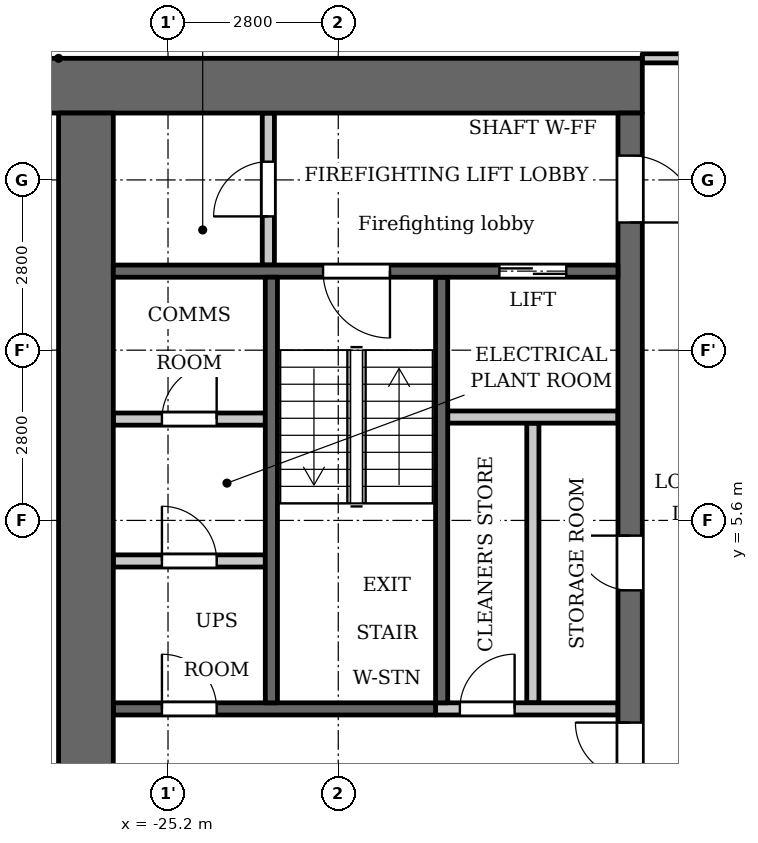
"""IFC4 building model, lengths in metres.
Left out: names, types, materials, properties, quantities, classifications, styles, units other than length and angle.
Written with IfcOpenShell. Run it as: python <this file> out.ifc"""

import sys

from ifc_helpers import new_model, si_unit, direction, frame, frame_2d, origin, place, context, subcontext, project, spatial, rectangle, extrude, element, fill, save


model = new_model("IFC4")
c1 = context("Model", 3, precision=1e-05, world=origin(), true_north=direction((0.0, 1.0)))
c2 = subcontext(c1, "Body", "Model", "MODEL_VIEW")
j1 = project(units=[si_unit("LENGTHUNIT", "METRE"), si_unit("PLANEANGLEUNIT", "RADIAN")], contexts=[c1])
p1 = place(None, origin())
s1 = spatial("IfcSite", under=j1, at=p1, CompositionType="ELEMENT")
p2 = place(p1, origin())
s2 = spatial("IfcBuilding", under=s1, at=p2, CompositionType="ELEMENT")
p3 = place(p2, frame((0.0, 0.0, 48.0)))
s3 = spatial("IfcBuildingStorey", under=s2, at=p3, CompositionType="ELEMENT", Elevation=48.0)
p4 = place(p3, frame((-20.7, 2.6, 0.0), z_axis=(0.0, 0.0, 1.0), x_axis=(0.0, 1.0, 0.0)))
e1 = element("IfcWall", 1, at=p4, inside=s3, PredefinedType="SHEAR", context=c2, shape_type="SweptSolid", body=[
    extrude(rectangle(XDim=7.0, YDim=0.2, at=frame_2d((3.5, 0.0))), origin(), (0.0, 0.0, 1.0), 3.2),
])
p5 = place(p3, frame((-20.8, 2.5, 0.0), z_axis=(0.0, 0.0, 1.0), x_axis=(-1.0, 0.0, 0.0)))
e2 = element("IfcWall", 2, at=p5, inside=s3, PredefinedType="SHEAR", context=c2, shape_type="SweptSolid", body=[
    extrude(rectangle(XDim=5.3, YDim=0.2, at=frame_2d((2.65, 0.0))), origin(), (0.0, 0.0, 1.0), 3.2),
])
p6 = place(p5, frame((3.6, 0.0, 0.0)))
e3 = element("IfcOpeningElement", 3, at=p6, cuts=e2, PredefinedType="OPENING", context=c2, shape_type="SweptSolid", body=[
    extrude(rectangle(XDim=0.9, YDim=2.1, at=frame_2d((0.45, 1.05))), frame((0.0, 0.11, 0.0), z_axis=(0.0, -1.0, 0.0), x_axis=(1.0, 0.0, 0.0)), (0.0, 0.0, 1.0), 0.22),
])
p7 = place(p3, frame((-17.4, 12.75, 0.0), z_axis=(0.0, 0.0, 1.0), x_axis=(-1.0, 0.0, 0.0)))
e4 = element("IfcWall", 4, at=p7, inside=s3, PredefinedType="SHEAR", context=c2, shape_type="SweptSolid", body=[
    extrude(rectangle(XDim=10.4, YDim=0.9, at=frame_2d((5.2, 0.0))), origin(), (0.0, 0.0, 1.0), 3.2),
])
p8 = place(p3, frame((-19.2, 2.6, 0.0), z_axis=(0.0, 0.0, 1.0), x_axis=(0.0, 1.0, 0.0)))
e5 = element("IfcWall", 5, at=p8, inside=s3, PredefinedType="PARTITIONING", context=c2, shape_type="SweptSolid", body=[
    extrude(rectangle(XDim=4.6, YDim=0.2, at=frame_2d((2.3, 0.0))), origin(), (0.0, 0.0, 1.0), 3.2),
])
p9 = place(p3, frame((-17.6, -12.3, 0.0), z_axis=(0.0, 0.0, 1.0), x_axis=(0.0, 1.0, 0.0)))
e6 = element("IfcWall", 6, at=p9, inside=s3, PredefinedType="SHEAR", context=c2, shape_type="SweptSolid", body=[
    extrude(rectangle(XDim=24.6, YDim=0.4, at=frame_2d((12.3, 0.0))), origin(), (0.0, 0.0, 1.0), 3.2),
])
p10 = place(p9, frame((6.0, 0.0, 0.0)))
e7 = element("IfcOpeningElement", 7, at=p10, cuts=e6, PredefinedType="OPENING", context=c2, shape_type="SweptSolid", body=[
    extrude(rectangle(XDim=1.1, YDim=2.1, at=frame_2d((0.55, 1.05))), frame((0.0, 0.21, 0.0), z_axis=(0.0, -1.0, 0.0), x_axis=(1.0, 0.0, 0.0)), (0.0, 0.0, 1.0), 0.42),
])
p11 = place(p9, frame((8.4, 0.0, 0.0)))
e8 = element("IfcOpeningElement", 8, at=p11, cuts=e6, PredefinedType="OPENING", context=c2, shape_type="SweptSolid", body=[
    extrude(rectangle(XDim=1.1, YDim=2.1, at=frame_2d((0.55, 1.05))), frame((0.0, 0.21, 0.0), z_axis=(0.0, -1.0, 0.0), x_axis=(1.0, 0.0, 0.0)), (0.0, 0.0, 1.0), 0.42),
])
p12 = place(p9, frame((10.8, 0.0, 0.0)))
e9 = element("IfcOpeningElement", 9, at=p12, cuts=e6, PredefinedType="OPENING", context=c2, shape_type="SweptSolid", body=[
    extrude(rectangle(XDim=1.1, YDim=2.1, at=frame_2d((0.55, 1.05))), frame((0.0, 0.21, 0.0), z_axis=(0.0, -1.0, 0.0), x_axis=(1.0, 0.0, 0.0)), (0.0, 0.0, 1.0), 0.42),
])
p13 = place(p9, frame((16.75, 0.0, 0.0)))
e10 = element("IfcOpeningElement", 10, at=p13, cuts=e6, PredefinedType="OPENING", context=c2, shape_type="SweptSolid", body=[
    extrude(rectangle(XDim=0.9, YDim=2.1, at=frame_2d((0.45, 1.05))), frame((0.0, 0.21, 0.0), z_axis=(0.0, -1.0, 0.0), x_axis=(1.0, 0.0, 0.0)), (0.0, 0.0, 1.0), 0.42),
])
p14 = place(p9, frame((22.8, 0.0, 0.0)))
e11 = element("IfcOpeningElement", 11, at=p14, cuts=e6, PredefinedType="OPENING", context=c2, shape_type="SweptSolid", body=[
    extrude(rectangle(XDim=1.1, YDim=2.1, at=frame_2d((0.55, 1.05))), frame((0.0, 0.21, 0.0), z_axis=(0.0, -1.0, 0.0), x_axis=(1.0, 0.0, 0.0)), (0.0, 0.0, 1.0), 0.42),
])
p15 = place(p9, frame((0.7, 0.0, 0.0)))
e12 = element("IfcOpeningElement", 12, at=p15, cuts=e6, PredefinedType="OPENING", context=c2, shape_type="SweptSolid", body=[
    extrude(rectangle(XDim=1.1, YDim=2.1, at=frame_2d((0.55, 1.05))), frame((0.0, 0.21, 0.0), z_axis=(0.0, -1.0, 0.0), x_axis=(1.0, 0.0, 0.0)), (0.0, 0.0, 1.0), 0.42),
])
p16 = place(p9, frame((12.775, 0.0, 0.0)))
e13 = element("IfcOpeningElement", 13, at=p16, cuts=e6, PredefinedType="OPENING", context=c2, shape_type="SweptSolid", body=[
    extrude(rectangle(XDim=1.8, YDim=2.1, at=frame_2d((0.9, 1.05))), frame((0.0, 0.21, 0.0), z_axis=(0.0, -1.0, 0.0), x_axis=(1.0, 0.0, 0.0)), (0.0, 0.0, 1.0), 0.42),
])
p17 = place(p3, frame((-26.55, -12.3, 0.0), z_axis=(0.0, 0.0, 1.0), x_axis=(0.0, 1.0, 0.0)))
e14 = element("IfcWall", 14, at=p17, inside=s3, PredefinedType="SHEAR", context=c2, shape_type="SweptSolid", body=[
    extrude(rectangle(XDim=24.6, YDim=0.9, at=frame_2d((12.3, 0.0))), origin(), (0.0, 0.0, 1.0), 3.2),
])
p18 = place(p3, frame((-23.55, 9.8, 0.0), z_axis=(0.0, 0.0, 1.0), x_axis=(0.0, 1.0, 0.0)))
e15 = element("IfcWall", 15, at=p18, inside=s3, PredefinedType="PARTITIONING", context=c2, shape_type="SweptSolid", body=[
    extrude(rectangle(XDim=2.5, YDim=0.2, at=frame_2d((1.25, 0.0))), origin(), (0.0, 0.0, 1.0), 3.2),
])
p19 = place(p18, frame((0.8, 0.0, 0.0)))
e16 = element("IfcOpeningElement", 16, at=p19, cuts=e15, PredefinedType="OPENING", context=c2, shape_type="SweptSolid", body=[
    extrude(rectangle(XDim=0.9, YDim=2.1, at=frame_2d((0.45, 1.05))), frame((0.0, 0.11, 0.0), z_axis=(0.0, -1.0, 0.0), x_axis=(1.0, 0.0, 0.0)), (0.0, 0.0, 1.0), 0.22),
])
p20 = place(p3, frame((-23.6, 4.933, 0.0), z_axis=(0.0, 0.0, 1.0), x_axis=(-1.0, 0.0, 0.0)))
e17 = element("IfcWall", 17, at=p20, inside=s3, PredefinedType="PARTITIONING", context=c2, shape_type="SweptSolid", body=[
    extrude(rectangle(XDim=2.5, YDim=0.2, at=frame_2d((1.25, 0.0))), origin(), (0.0, 0.0, 1.0), 3.2),
])
p21 = place(p20, frame((0.8, 0.0, 0.0)))
e18 = element("IfcOpeningElement", 18, at=p21, cuts=e17, PredefinedType="OPENING", context=c2, shape_type="SweptSolid", body=[
    extrude(rectangle(XDim=0.9, YDim=2.1, at=frame_2d((0.45, 1.05))), frame((0.0, 0.11, 0.0), z_axis=(0.0, -1.0, 0.0), x_axis=(1.0, 0.0, 0.0)), (0.0, 0.0, 1.0), 0.22),
])
p22 = place(p3, frame((-23.6, 7.267, 0.0), z_axis=(0.0, 0.0, 1.0), x_axis=(-1.0, 0.0, 0.0)))
e19 = element("IfcWall", 19, at=p22, inside=s3, PredefinedType="PARTITIONING", context=c2, shape_type="SweptSolid", body=[
    extrude(rectangle(XDim=2.5, YDim=0.2, at=frame_2d((1.25, 0.0))), origin(), (0.0, 0.0, 1.0), 3.2),
])
p23 = place(p22, frame((0.8, 0.0, 0.0)))
e20 = element("IfcOpeningElement", 20, at=p23, cuts=e19, PredefinedType="OPENING", context=c2, shape_type="SweptSolid", body=[
    extrude(rectangle(XDim=0.9, YDim=2.1, at=frame_2d((0.45, 1.05))), frame((0.0, 0.11, 0.0), z_axis=(0.0, -1.0, 0.0), x_axis=(1.0, 0.0, 0.0)), (0.0, 0.0, 1.0), 0.22),
])
p24 = place(p3, frame((-17.8, 2.5, 0.0), z_axis=(0.0, 0.0, 1.0), x_axis=(-1.0, 0.0, 0.0)))
e21 = element("IfcWall", 21, at=p24, inside=s3, PredefinedType="PARTITIONING", context=c2, shape_type="SweptSolid", body=[
    extrude(rectangle(XDim=3.0, YDim=0.2, at=frame_2d((1.5, 0.0))), origin(), (0.0, 0.0, 1.0), 3.2),
])
p25 = place(p24, frame((1.7, 0.0, 0.0)))
e22 = element("IfcOpeningElement", 22, at=p25, cuts=e21, PredefinedType="OPENING", context=c2, shape_type="SweptSolid", body=[
    extrude(rectangle(XDim=0.9, YDim=2.1, at=frame_2d((0.45, 1.05))), frame((0.0, 0.11, 0.0), z_axis=(0.0, -1.0, 0.0), x_axis=(1.0, 0.0, 0.0)), (0.0, 0.0, 1.0), 0.22),
])
p26 = place(p3, frame((-17.8, 7.3, 0.0), z_axis=(0.0, 0.0, 1.0), x_axis=(-1.0, 0.0, 0.0)))
e23 = element("IfcWall", 23, at=p26, inside=s3, PredefinedType="PARTITIONING", context=c2, shape_type="SweptSolid", body=[
    extrude(rectangle(XDim=2.8, YDim=0.2, at=frame_2d((1.4, 0.0))), origin(), (0.0, 0.0, 1.0), 3.2),
])
p27 = place(p3, frame((-17.8, 9.7, 0.0), z_axis=(0.0, 0.0, 1.0), x_axis=(-1.0, 0.0, 0.0)))
e24 = element("IfcWall", 24, at=p27, inside=s3, PredefinedType="SHEAR", context=c2, shape_type="SweptSolid", body=[
    extrude(rectangle(XDim=8.3, YDim=0.2, at=frame_2d((4.15, 0.0))), origin(), (0.0, 0.0, 1.0), 3.2),
])
p28 = place(p27, frame((0.85, 0.0, 0.0)))
e25 = element("IfcOpeningElement", 25, at=p28, cuts=e24, PredefinedType="OPENING", context=c2, shape_type="SweptSolid", body=[
    extrude(rectangle(XDim=1.1, YDim=2.1, at=frame_2d((0.55, 1.05))), frame((0.0, 0.11, 0.0), z_axis=(0.0, -1.0, 0.0), x_axis=(1.0, 0.0, 0.0)), (0.0, 0.0, 1.0), 0.22),
])
p29 = place(p27, frame((3.75, 0.0, 0.0)))
e26 = element("IfcOpeningElement", 26, at=p29, cuts=e24, PredefinedType="OPENING", context=c2, shape_type="SweptSolid", body=[
    extrude(rectangle(XDim=1.1, YDim=2.1, at=frame_2d((0.55, 1.05))), frame((0.0, 0.11, 0.0), z_axis=(0.0, -1.0, 0.0), x_axis=(1.0, 0.0, 0.0)), (0.0, 0.0, 1.0), 0.22),
])
p30 = place(p3, frame((-23.5, 2.6, 0.0), z_axis=(0.0, 0.0, 1.0), x_axis=(0.0, 1.0, 0.0)))
e27 = element("IfcWall", 27, at=p30, inside=s3, PredefinedType="SHEAR", context=c2, shape_type="SweptSolid", body=[
    extrude(rectangle(XDim=7.0, YDim=0.2, at=frame_2d((3.5, 0.0))), origin(), (0.0, 0.0, 1.0), 3.2),
])
p31 = place(p3, frame((-17.4, 13.2, 0.0), z_axis=(0.0, 0.0, 1.0), x_axis=(1.0, 0.0, 0.0)))
e28 = element("IfcWall", 28, at=p31, inside=s3, PredefinedType="PARTITIONING", context=c2, shape_type="SweptSolid", body=[
    extrude(rectangle(XDim=34.8, YDim=0.15, at=frame_2d((17.4, 0.0))), origin(), (0.0, 0.0, 1.0), 3.2),
])
p32 = place(p31, frame((0.75, 0.0, 0.0)))
e29 = element("IfcOpeningElement", 29, at=p32, cuts=e28, PredefinedType="OPENING", context=c2, shape_type="SweptSolid", body=[
    extrude(rectangle(XDim=1.0, YDim=2.1, at=frame_2d((0.5, 1.05))), frame((0.0, 0.085, 0.0), z_axis=(0.0, -1.0, 0.0), x_axis=(1.0, 0.0, 0.0)), (0.0, 0.0, 1.0), 0.17),
])
p33 = place(p31, frame((33.15, 0.0, 0.0)))
e30 = element("IfcOpeningElement", 30, at=p33, cuts=e28, PredefinedType="OPENING", context=c2, shape_type="SweptSolid", body=[
    extrude(rectangle(XDim=1.0, YDim=2.1, at=frame_2d((0.5, 1.05))), frame((0.0, 0.085, 0.0), z_axis=(0.0, -1.0, 0.0), x_axis=(1.0, 0.0, 0.0)), (0.0, 0.0, 1.0), 0.17),
])
p34 = place(p31, frame((3.05, 0.0, 0.0)))
e31 = element("IfcOpeningElement", 31, at=p34, cuts=e28, PredefinedType="OPENING", context=c2, shape_type="SweptSolid", body=[
    extrude(rectangle(XDim=1.0, YDim=2.1, at=frame_2d((0.5, 1.05))), frame((0.0, 0.085, 0.0), z_axis=(0.0, -1.0, 0.0), x_axis=(1.0, 0.0, 0.0)), (0.0, 0.0, 1.0), 0.17),
])
p35 = place(p31, frame((12.45, 0.0, 0.0)))
e32 = element("IfcOpeningElement", 32, at=p35, cuts=e28, PredefinedType="OPENING", context=c2, shape_type="SweptSolid", body=[
    extrude(rectangle(XDim=1.0, YDim=2.1, at=frame_2d((0.5, 1.05))), frame((0.0, 0.085, 0.0), z_axis=(0.0, -1.0, 0.0), x_axis=(1.0, 0.0, 0.0)), (0.0, 0.0, 1.0), 0.17),
])
p36 = place(p31, frame((18.3, 0.0, 0.0)))
e33 = element("IfcOpeningElement", 33, at=p36, cuts=e28, PredefinedType="OPENING", context=c2, shape_type="SweptSolid", body=[
    extrude(rectangle(XDim=1.0, YDim=2.1, at=frame_2d((0.5, 1.05))), frame((0.0, 0.085, 0.0), z_axis=(0.0, -1.0, 0.0), x_axis=(1.0, 0.0, 0.0)), (0.0, 0.0, 1.0), 0.17),
])
p37 = place(p31, frame((29.25, 0.0, 0.0)))
e34 = element("IfcOpeningElement", 34, at=p37, cuts=e28, PredefinedType="OPENING", context=c2, shape_type="SweptSolid", body=[
    extrude(rectangle(XDim=1.0, YDim=2.1, at=frame_2d((0.5, 1.05))), frame((0.0, 0.085, 0.0), z_axis=(0.0, -1.0, 0.0), x_axis=(1.0, 0.0, 0.0)), (0.0, 0.0, 1.0), 0.17),
])
p38 = place(p13, origin())
e35 = element("IfcDoor", 35, at=p38, inside=s3, OperationType="SINGLE_SWING_LEFT", PredefinedType="DOOR", context=c2, shape_type="SweptSolid", body=[
    extrude(rectangle(XDim=0.9, YDim=2.1, at=frame_2d((0.45, 1.05))), frame((0.0, 0.025, 0.0), z_axis=(0.0, -1.0, 0.0), x_axis=(1.0, 0.0, 0.0)), (0.0, 0.0, 1.0), 0.05),
])
fill(e10, e35)
p39 = place(p25, origin())
e36 = element("IfcDoor", 36, at=p39, inside=s3, OperationType="SINGLE_SWING_LEFT", PredefinedType="DOOR", context=c2, shape_type="SweptSolid", body=[
    extrude(rectangle(XDim=0.9, YDim=2.1, at=frame_2d((0.45, 1.05))), frame((0.0, 0.025, 0.0), z_axis=(0.0, -1.0, 0.0), x_axis=(1.0, 0.0, 0.0)), (0.0, 0.0, 1.0), 0.05),
])
fill(e22, e36)
p40 = place(p28, origin())
e37 = element("IfcDoor", 37, at=p40, inside=s3, OperationType="DOUBLE_DOOR_SLIDING", PredefinedType="DOOR", context=c2, shape_type="SweptSolid", body=[
    extrude(rectangle(XDim=1.1, YDim=2.1, at=frame_2d((0.55, 1.05))), frame((0.0, 0.025, 0.0), z_axis=(0.0, -1.0, 0.0), x_axis=(1.0, 0.0, 0.0)), (0.0, 0.0, 1.0), 0.05),
])
fill(e25, e37)
p41 = place(p14, origin())
e38 = element("IfcDoor", 38, at=p41, inside=s3, OperationType="SINGLE_SWING_LEFT", PredefinedType="DOOR", context=c2, shape_type="SweptSolid", body=[
    extrude(rectangle(XDim=1.1, YDim=2.1, at=frame_2d((0.55, 1.05))), frame((0.0, 0.025, 0.0), z_axis=(0.0, -1.0, 0.0), x_axis=(1.0, 0.0, 0.0)), (0.0, 0.0, 1.0), 0.05),
])
fill(e11, e38)
p42 = place(p19, origin())
e39 = element("IfcDoor", 39, at=p42, inside=s3, OperationType="SINGLE_SWING_RIGHT", PredefinedType="DOOR", context=c2, shape_type="SweptSolid", body=[
    extrude(rectangle(XDim=0.9, YDim=2.1, at=frame_2d((0.45, 1.05))), frame((0.0, 0.025, 0.0), z_axis=(0.0, -1.0, 0.0), x_axis=(1.0, 0.0, 0.0)), (0.0, 0.0, 1.0), 0.05),
])
fill(e16, e39)
p43 = place(p29, origin())
e40 = element("IfcDoor", 40, at=p43, inside=s3, OperationType="SINGLE_SWING_RIGHT", PredefinedType="DOOR", context=c2, shape_type="SweptSolid", body=[
    extrude(rectangle(XDim=1.1, YDim=2.1, at=frame_2d((0.55, 1.05))), frame((0.0, 0.025, 0.0), z_axis=(0.0, -1.0, 0.0), x_axis=(1.0, 0.0, 0.0)), (0.0, 0.0, 1.0), 0.05),
])
fill(e26, e40)
p44 = place(p16, origin())
e41 = element("IfcDoor", 41, at=p44, inside=s3, OperationType="DOUBLE_DOOR_SINGLE_SWING", PredefinedType="DOOR", context=c2, shape_type="SweptSolid", body=[
    extrude(rectangle(XDim=1.8, YDim=2.1, at=frame_2d((0.9, 1.05))), frame((0.0, 0.025, 0.0), z_axis=(0.0, -1.0, 0.0), x_axis=(1.0, 0.0, 0.0)), (0.0, 0.0, 1.0), 0.05),
])
fill(e13, e41)
p45 = place(p21, origin())
e42 = element("IfcDoor", 42, at=p45, inside=s3, OperationType="SINGLE_SWING_RIGHT", PredefinedType="DOOR", context=c2, shape_type="SweptSolid", body=[
    extrude(rectangle(XDim=0.9, YDim=2.1, at=frame_2d((0.45, 1.05))), frame((0.0, 0.025, 0.0), z_axis=(0.0, -1.0, 0.0), x_axis=(1.0, 0.0, 0.0)), (0.0, 0.0, 1.0), 0.05),
])
fill(e18, e42)
p46 = place(p23, origin())
e43 = element("IfcDoor", 43, at=p46, inside=s3, OperationType="SINGLE_SWING_LEFT", PredefinedType="DOOR", context=c2, shape_type="SweptSolid", body=[
    extrude(rectangle(XDim=0.9, YDim=2.1, at=frame_2d((0.45, 1.05))), frame((0.0, 0.025, 0.0), z_axis=(0.0, -1.0, 0.0), x_axis=(1.0, 0.0, 0.0)), (0.0, 0.0, 1.0), 0.05),
])
fill(e20, e43)
p47 = place(p6, origin())
e44 = element("IfcDoor", 44, at=p47, inside=s3, OperationType="SINGLE_SWING_RIGHT", PredefinedType="DOOR", context=c2, shape_type="SweptSolid", body=[
    extrude(rectangle(XDim=0.9, YDim=2.1, at=frame_2d((0.45, 1.05))), frame((0.0, 0.025, 0.0), z_axis=(0.0, -1.0, 0.0), x_axis=(1.0, 0.0, 0.0)), (0.0, 0.0, 1.0), 0.05),
])
fill(e3, e44)
save(model, sys.argv[1])
